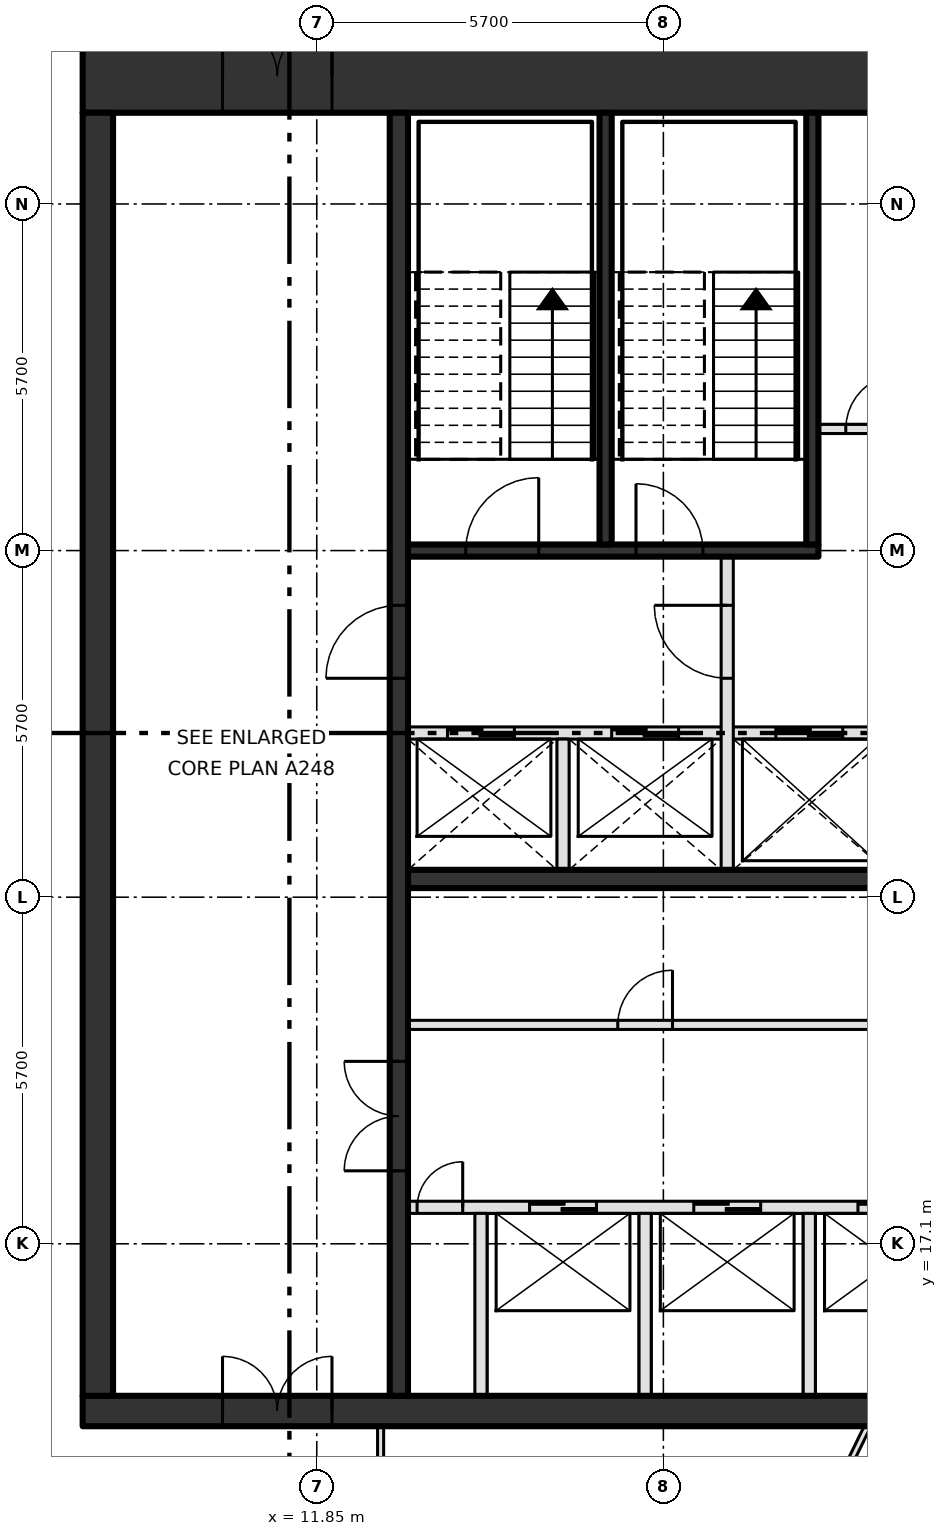
"""IFC4 building model, lengths in metres.
Left out: names, types, materials, properties, quantities, classifications, styles, units other than length and angle.
Written with IfcOpenShell. Run it as: python <this file> out.ifc"""

import sys

from ifc_helpers import new_model, si_unit, direction, frame, frame_2d, origin, place, context, subcontext, project, spatial, rectangle, extrude, element, fill, save


model = new_model("IFC4")
c1 = context("Model", 3, precision=1e-05, world=origin(), true_north=direction((0.0, 1.0)))
c2 = subcontext(c1, "Body", "Model", "MODEL_VIEW")
j1 = project(units=[si_unit("LENGTHUNIT", "METRE"), si_unit("PLANEANGLEUNIT", "RADIAN")], contexts=[c1])
p1 = place(None, origin())
s1 = spatial("IfcSite", under=j1, at=p1, CompositionType="ELEMENT")
p2 = place(p1, origin())
s2 = spatial("IfcBuilding", under=s1, at=p2, CompositionType="ELEMENT")
p3 = place(p2, frame((0.0, 0.0, 366.6)))
s3 = spatial("IfcBuildingStorey", under=s2, at=p3, CompositionType="ELEMENT", Elevation=366.6)
p4 = place(p3, frame((8.0, 14.35, -0.3), z_axis=(0.0, 0.0, 1.0), x_axis=(1.0, 0.0, 0.0)))
e1 = element("IfcWall", 1, at=p4, inside=s3, PredefinedType="SHEAR", context=c2, shape_type="SweptSolid", body=[
    extrude(rectangle(XDim=22.8, YDim=0.5, at=frame_2d((11.4, 0.0))), origin(), (0.0, 0.0, 1.0), 4.2),
])
p5 = place(p4, frame((2.3, 0.0, 0.3)))
e2 = element("IfcOpeningElement", 2, at=p5, cuts=e1, PredefinedType="OPENING", context=c2, shape_type="SweptSolid", body=[
    extrude(rectangle(XDim=1.8, YDim=2.1, at=frame_2d((0.9, 1.05))), frame((0.0, 0.26, 0.0), z_axis=(0.0, -1.0, 0.0), x_axis=(1.0, 0.0, 0.0)), (0.0, 0.0, 1.0), 0.52),
])
p6 = place(p3, frame((8.0, 36.3, -0.3), z_axis=(0.0, 0.0, 1.0), x_axis=(1.0, 0.0, 0.0)))
e3 = element("IfcWall", 3, at=p6, inside=s3, PredefinedType="SHEAR", context=c2, shape_type="SweptSolid", body=[
    extrude(rectangle(XDim=22.8, YDim=1.2, at=frame_2d((11.4, 0.0))), origin(), (0.0, 0.0, 1.0), 4.2),
])
p7 = place(p6, frame((2.3, 0.0, 0.3)))
e4 = element("IfcOpeningElement", 4, at=p7, cuts=e3, PredefinedType="OPENING", context=c2, shape_type="SweptSolid", body=[
    extrude(rectangle(XDim=1.8, YDim=2.1, at=frame_2d((0.9, 1.05))), frame((0.0, 0.61, 0.0), z_axis=(0.0, -1.0, 0.0), x_axis=(1.0, 0.0, 0.0)), (0.0, 0.0, 1.0), 1.22),
])
p8 = place(p3, frame((8.25, 14.6, -0.3), z_axis=(0.0, 0.0, 1.0), x_axis=(0.0, 1.0, 0.0)))
e5 = element("IfcWall", 5, at=p8, inside=s3, PredefinedType="SHEAR", context=c2, shape_type="SweptSolid", body=[
    extrude(rectangle(XDim=21.1, YDim=0.5, at=frame_2d((10.55, 0.0))), origin(), (0.0, 0.0, 1.0), 4.2),
])
p9 = place(p3, frame((13.35, 17.7, 0.0), z_axis=(0.0, 0.0, 1.0), x_axis=(1.0, 0.0, 0.0)))
e6 = element("IfcWall", 6, at=p9, inside=s3, PredefinedType="SOLIDWALL", context=c2, shape_type="SweptSolid", body=[
    extrude(rectangle(XDim=13.425, YDim=0.2, at=frame_2d((6.712, 0.0))), origin(), (0.0, 0.0, 1.0), 3.9),
])
p10 = place(p9, frame((2.0, 0.0, 0.0)))
e7 = element("IfcOpeningElement", 7, at=p10, cuts=e6, PredefinedType="OPENING", context=c2, shape_type="SweptSolid", body=[
    extrude(rectangle(XDim=1.1, YDim=2.1, at=frame_2d((0.55, 1.05))), frame((0.0, 0.11, 0.0), z_axis=(0.0, -1.0, 0.0), x_axis=(1.0, 0.0, 0.0)), (0.0, 0.0, 1.0), 0.22),
])
p11 = place(p9, frame((4.7, 0.0, 0.0)))
e8 = element("IfcOpeningElement", 8, at=p11, cuts=e6, PredefinedType="OPENING", context=c2, shape_type="SweptSolid", body=[
    extrude(rectangle(XDim=1.1, YDim=2.1, at=frame_2d((0.55, 1.05))), frame((0.0, 0.11, 0.0), z_axis=(0.0, -1.0, 0.0), x_axis=(1.0, 0.0, 0.0)), (0.0, 0.0, 1.0), 0.22),
])
p12 = place(p9, frame((7.4, 0.0, 0.0)))
e9 = element("IfcOpeningElement", 9, at=p12, cuts=e6, PredefinedType="OPENING", context=c2, shape_type="SweptSolid", body=[
    extrude(rectangle(XDim=1.1, YDim=2.1, at=frame_2d((0.55, 1.05))), frame((0.0, 0.11, 0.0), z_axis=(0.0, -1.0, 0.0), x_axis=(1.0, 0.0, 0.0)), (0.0, 0.0, 1.0), 0.22),
])
p13 = place(p9, frame((10.1, 0.0, 0.0)))
e10 = element("IfcOpeningElement", 10, at=p13, cuts=e6, PredefinedType="OPENING", context=c2, shape_type="SweptSolid", body=[
    extrude(rectangle(XDim=1.1, YDim=2.1, at=frame_2d((0.55, 1.05))), frame((0.0, 0.11, 0.0), z_axis=(0.0, -1.0, 0.0), x_axis=(1.0, 0.0, 0.0)), (0.0, 0.0, 1.0), 0.22),
])
p14 = place(p9, frame((0.15, 0.0, 0.0)))
e11 = element("IfcOpeningElement", 11, at=p14, cuts=e6, PredefinedType="OPENING", context=c2, shape_type="SweptSolid", body=[
    extrude(rectangle(XDim=0.75, YDim=2.1, at=frame_2d((0.375, 1.05))), frame((0.0, 0.11, 0.0), z_axis=(0.0, -1.0, 0.0), x_axis=(1.0, 0.0, 0.0)), (0.0, 0.0, 1.0), 0.22),
])
p15 = place(p9, frame((12.3, 0.0, 0.0)))
e12 = element("IfcOpeningElement", 12, at=p15, cuts=e6, PredefinedType="OPENING", context=c2, shape_type="SweptSolid", body=[
    extrude(rectangle(XDim=0.75, YDim=2.1, at=frame_2d((0.375, 1.05))), frame((0.0, 0.11, 0.0), z_axis=(0.0, -1.0, 0.0), x_axis=(1.0, 0.0, 0.0)), (0.0, 0.0, 1.0), 0.22),
])
p16 = place(p3, frame((13.35, 20.7, 0.0), z_axis=(0.0, 0.0, 1.0), x_axis=(1.0, 0.0, 0.0)))
e13 = element("IfcWall", 13, at=p16, inside=s3, PredefinedType="PARTITIONING", context=c2, shape_type="SweptSolid", body=[
    extrude(rectangle(XDim=13.425, YDim=0.15, at=frame_2d((6.712, 0.0))), origin(), (0.0, 0.0, 1.0), 3.9),
])
p17 = place(p16, frame((3.45, 0.0, 0.0)))
e14 = element("IfcOpeningElement", 14, at=p17, cuts=e13, PredefinedType="OPENING", context=c2, shape_type="SweptSolid", body=[
    extrude(rectangle(XDim=0.9, YDim=2.1, at=frame_2d((0.45, 1.05))), frame((0.0, 0.085, 0.0), z_axis=(0.0, -1.0, 0.0), x_axis=(1.0, 0.0, 0.0)), (0.0, 0.0, 1.0), 0.17),
])
p18 = place(p16, frame((10.2, 0.0, 0.0)))
e15 = element("IfcOpeningElement", 15, at=p18, cuts=e13, PredefinedType="OPENING", context=c2, shape_type="SweptSolid", body=[
    extrude(rectangle(XDim=0.9, YDim=2.1, at=frame_2d((0.45, 1.05))), frame((0.0, 0.085, 0.0), z_axis=(0.0, -1.0, 0.0), x_axis=(1.0, 0.0, 0.0)), (0.0, 0.0, 1.0), 0.17),
])
p19 = place(p3, frame((13.35, 23.1, 0.0), z_axis=(0.0, 0.0, 1.0), x_axis=(1.0, 0.0, 0.0)))
e16 = element("IfcWall", 16, at=p19, inside=s3, PredefinedType="SHEAR", context=c2, shape_type="SweptSolid", body=[
    extrude(rectangle(XDim=16.95, YDim=0.3, at=frame_2d((8.475, 0.0))), origin(), (0.0, 0.0, 1.0), 3.9),
])
p20 = place(p3, frame((13.35, 25.5, 0.0), z_axis=(0.0, 0.0, 1.0), x_axis=(1.0, 0.0, 0.0)))
e17 = element("IfcWall", 17, at=p20, inside=s3, PredefinedType="SOLIDWALL", context=c2, shape_type="SweptSolid", body=[
    extrude(rectangle(XDim=16.95, YDim=0.2, at=frame_2d((8.475, 0.0))), origin(), (0.0, 0.0, 1.0), 3.9),
])
p21 = place(p20, frame((0.65, 0.0, 0.0)))
e18 = element("IfcOpeningElement", 18, at=p21, cuts=e17, PredefinedType="OPENING", context=c2, shape_type="SweptSolid", body=[
    extrude(rectangle(XDim=1.1, YDim=2.1, at=frame_2d((0.55, 1.05))), frame((0.0, 0.11, 0.0), z_axis=(0.0, -1.0, 0.0), x_axis=(1.0, 0.0, 0.0)), (0.0, 0.0, 1.0), 0.22),
])
p22 = place(p20, frame((3.35, 0.0, 0.0)))
e19 = element("IfcOpeningElement", 19, at=p22, cuts=e17, PredefinedType="OPENING", context=c2, shape_type="SweptSolid", body=[
    extrude(rectangle(XDim=1.1, YDim=2.1, at=frame_2d((0.55, 1.05))), frame((0.0, 0.11, 0.0), z_axis=(0.0, -1.0, 0.0), x_axis=(1.0, 0.0, 0.0)), (0.0, 0.0, 1.0), 0.22),
])
p23 = place(p20, frame((6.05, 0.0, 0.0)))
e20 = element("IfcOpeningElement", 20, at=p23, cuts=e17, PredefinedType="OPENING", context=c2, shape_type="SweptSolid", body=[
    extrude(rectangle(XDim=1.1, YDim=2.1, at=frame_2d((0.55, 1.05))), frame((0.0, 0.11, 0.0), z_axis=(0.0, -1.0, 0.0), x_axis=(1.0, 0.0, 0.0)), (0.0, 0.0, 1.0), 0.22),
])
p24 = place(p20, frame((8.75, 0.0, 0.0)))
e21 = element("IfcOpeningElement", 21, at=p24, cuts=e17, PredefinedType="OPENING", context=c2, shape_type="SweptSolid", body=[
    extrude(rectangle(XDim=1.1, YDim=2.1, at=frame_2d((0.55, 1.05))), frame((0.0, 0.11, 0.0), z_axis=(0.0, -1.0, 0.0), x_axis=(1.0, 0.0, 0.0)), (0.0, 0.0, 1.0), 0.22),
])
p25 = place(p20, frame((13.0, 0.0, 0.0)))
e22 = element("IfcOpeningElement", 22, at=p25, cuts=e17, PredefinedType="OPENING", context=c2, shape_type="SweptSolid", body=[
    extrude(rectangle(XDim=0.9, YDim=2.1, at=frame_2d((0.45, 1.05))), frame((0.0, 0.11, 0.0), z_axis=(0.0, -1.0, 0.0), x_axis=(1.0, 0.0, 0.0)), (0.0, 0.0, 1.0), 0.22),
])
p26 = place(p3, frame((13.35, 28.5, 0.0), z_axis=(0.0, 0.0, 1.0), x_axis=(1.0, 0.0, 0.0)))
e23 = element("IfcWall", 23, at=p26, inside=s3, PredefinedType="SOLIDWALL", context=c2, shape_type="SweptSolid", body=[
    extrude(rectangle(XDim=6.75, YDim=0.2, at=frame_2d((3.375, 0.0))), origin(), (0.0, 0.0, 1.0), 3.9),
])
p27 = place(p26, frame((0.95, 0.0, 0.0)))
e24 = element("IfcOpeningElement", 24, at=p27, cuts=e23, PredefinedType="OPENING", context=c2, shape_type="SweptSolid", body=[
    extrude(rectangle(XDim=1.2, YDim=2.1, at=frame_2d((0.6, 1.05))), frame((0.0, 0.11, 0.0), z_axis=(0.0, -1.0, 0.0), x_axis=(1.0, 0.0, 0.0)), (0.0, 0.0, 1.0), 0.22),
])
p28 = place(p26, frame((3.75, 0.0, 0.0)))
e25 = element("IfcOpeningElement", 25, at=p28, cuts=e23, PredefinedType="OPENING", context=c2, shape_type="SweptSolid", body=[
    extrude(rectangle(XDim=1.1, YDim=2.1, at=frame_2d((0.55, 1.05))), frame((0.0, 0.11, 0.0), z_axis=(0.0, -1.0, 0.0), x_axis=(1.0, 0.0, 0.0)), (0.0, 0.0, 1.0), 0.22),
])
p29 = place(p3, frame((20.1, 30.5, 0.0), z_axis=(0.0, 0.0, 1.0), x_axis=(1.0, 0.0, 0.0)))
e26 = element("IfcWall", 26, at=p29, inside=s3, PredefinedType="PARTITIONING", context=c2, shape_type="SweptSolid", body=[
    extrude(rectangle(XDim=10.2, YDim=0.15, at=frame_2d((5.1, 0.0))), origin(), (0.0, 0.0, 1.0), 3.9),
])
p30 = place(p29, frame((0.45, 0.0, 0.0)))
e27 = element("IfcOpeningElement", 27, at=p30, cuts=e26, PredefinedType="OPENING", context=c2, shape_type="SweptSolid", body=[
    extrude(rectangle(XDim=0.9, YDim=2.1, at=frame_2d((0.45, 1.05))), frame((0.0, 0.085, 0.0), z_axis=(0.0, -1.0, 0.0), x_axis=(1.0, 0.0, 0.0)), (0.0, 0.0, 1.0), 0.17),
])
p31 = place(p29, frame((3.35, 0.0, 0.0)))
e28 = element("IfcOpeningElement", 28, at=p31, cuts=e26, PredefinedType="OPENING", context=c2, shape_type="SweptSolid", body=[
    extrude(rectangle(XDim=0.9, YDim=2.1, at=frame_2d((0.45, 1.05))), frame((0.0, 0.085, 0.0), z_axis=(0.0, -1.0, 0.0), x_axis=(1.0, 0.0, 0.0)), (0.0, 0.0, 1.0), 0.17),
])
p32 = place(p29, frame((7.15, 0.0, 0.0)))
e29 = element("IfcOpeningElement", 29, at=p32, cuts=e26, PredefinedType="OPENING", context=c2, shape_type="SweptSolid", body=[
    extrude(rectangle(XDim=0.9, YDim=2.1, at=frame_2d((0.45, 1.05))), frame((0.0, 0.085, 0.0), z_axis=(0.0, -1.0, 0.0), x_axis=(1.0, 0.0, 0.0)), (0.0, 0.0, 1.0), 0.17),
])
p33 = place(p3, frame((13.2, 14.6, 0.0), z_axis=(0.0, 0.0, 1.0), x_axis=(0.0, 1.0, 0.0)))
e30 = element("IfcWall", 30, at=p33, inside=s3, PredefinedType="SHEAR", context=c2, shape_type="SweptSolid", body=[
    extrude(rectangle(XDim=21.1, YDim=0.3, at=frame_2d((10.55, 0.0))), origin(), (0.0, 0.0, 1.0), 3.9),
])
p34 = place(p33, frame((3.7, 0.0, 0.0)))
e31 = element("IfcOpeningElement", 31, at=p34, cuts=e30, PredefinedType="OPENING", context=c2, shape_type="SweptSolid", body=[
    extrude(rectangle(XDim=1.8, YDim=2.1, at=frame_2d((0.9, 1.05))), frame((0.0, 0.16, 0.0), z_axis=(0.0, -1.0, 0.0), x_axis=(1.0, 0.0, 0.0)), (0.0, 0.0, 1.0), 0.32),
])
p35 = place(p33, frame((11.8, 0.0, 0.0)))
e32 = element("IfcOpeningElement", 32, at=p35, cuts=e30, PredefinedType="OPENING", context=c2, shape_type="SweptSolid", body=[
    extrude(rectangle(XDim=1.2, YDim=2.1, at=frame_2d((0.6, 1.05))), frame((0.0, 0.16, 0.0), z_axis=(0.0, -1.0, 0.0), x_axis=(1.0, 0.0, 0.0)), (0.0, 0.0, 1.0), 0.32),
])
p36 = place(p3, frame((14.55, 14.6, 0.0), z_axis=(0.0, 0.0, 1.0), x_axis=(0.0, 1.0, 0.0)))
e33 = element("IfcWall", 33, at=p36, inside=s3, PredefinedType="SOLIDWALL", context=c2, shape_type="SweptSolid", body=[
    extrude(rectangle(XDim=3.0, YDim=0.2, at=frame_2d((1.5, 0.0))), origin(), (0.0, 0.0, 1.0), 3.9),
])
p37 = place(p3, frame((15.9, 23.25, 0.0), z_axis=(0.0, 0.0, 1.0), x_axis=(0.0, 1.0, 0.0)))
e34 = element("IfcWall", 34, at=p37, inside=s3, PredefinedType="SOLIDWALL", context=c2, shape_type="SweptSolid", body=[
    extrude(rectangle(XDim=2.15, YDim=0.2, at=frame_2d((1.075, 0.0))), origin(), (0.0, 0.0, 1.0), 3.9),
])
p38 = place(p3, frame((16.6, 28.6, 0.0), z_axis=(0.0, 0.0, 1.0), x_axis=(0.0, 1.0, 0.0)))
e35 = element("IfcWall", 35, at=p38, inside=s3, PredefinedType="SOLIDWALL", context=c2, shape_type="SweptSolid", body=[
    extrude(rectangle(XDim=7.1, YDim=0.2, at=frame_2d((3.55, 0.0))), origin(), (0.0, 0.0, 1.0), 3.9),
])
p39 = place(p3, frame((17.25, 14.6, 0.0), z_axis=(0.0, 0.0, 1.0), x_axis=(0.0, 1.0, 0.0)))
e36 = element("IfcWall", 36, at=p39, inside=s3, PredefinedType="SOLIDWALL", context=c2, shape_type="SweptSolid", body=[
    extrude(rectangle(XDim=3.0, YDim=0.2, at=frame_2d((1.5, 0.0))), origin(), (0.0, 0.0, 1.0), 3.9),
])
p40 = place(p3, frame((18.6, 23.25, 0.0), z_axis=(0.0, 0.0, 1.0), x_axis=(0.0, 1.0, 0.0)))
e37 = element("IfcWall", 37, at=p40, inside=s3, PredefinedType="SOLIDWALL", context=c2, shape_type="SweptSolid", body=[
    extrude(rectangle(XDim=5.15, YDim=0.2, at=frame_2d((2.575, 0.0))), origin(), (0.0, 0.0, 1.0), 3.9),
])
p41 = place(p40, frame((3.15, 0.0, 0.0)))
e38 = element("IfcOpeningElement", 38, at=p41, cuts=e37, PredefinedType="OPENING", context=c2, shape_type="SweptSolid", body=[
    extrude(rectangle(XDim=1.2, YDim=2.1, at=frame_2d((0.6, 1.05))), frame((0.0, 0.11, 0.0), z_axis=(0.0, -1.0, 0.0), x_axis=(1.0, 0.0, 0.0)), (0.0, 0.0, 1.0), 0.22),
])
p42 = place(p3, frame((19.95, 14.6, 0.0), z_axis=(0.0, 0.0, 1.0), x_axis=(0.0, 1.0, 0.0)))
e39 = element("IfcWall", 39, at=p42, inside=s3, PredefinedType="SOLIDWALL", context=c2, shape_type="SweptSolid", body=[
    extrude(rectangle(XDim=3.0, YDim=0.2, at=frame_2d((1.5, 0.0))), origin(), (0.0, 0.0, 1.0), 3.9),
])
p43 = place(p3, frame((20.0, 28.6, 0.0), z_axis=(0.0, 0.0, 1.0), x_axis=(0.0, 1.0, 0.0)))
e40 = element("IfcWall", 40, at=p43, inside=s3, PredefinedType="SOLIDWALL", context=c2, shape_type="SweptSolid", body=[
    extrude(rectangle(XDim=7.1, YDim=0.2, at=frame_2d((3.55, 0.0))), origin(), (0.0, 0.0, 1.0), 3.9),
])
p44 = place(p3, frame((12.9, 10.078, 0.0), z_axis=(0.0, 0.0, 1.0), x_axis=(0.0, 1.0, 0.0)))
e41 = element("IfcWall", 41, at=p44, inside=s3, PredefinedType="PARTITIONING", context=c2, shape_type="SweptSolid", body=[
    extrude(rectangle(XDim=4.022, YDim=0.1, at=frame_2d((2.011, 0.0))), origin(), (0.0, 0.0, 1.0), 3.9),
])
p45 = place(p3, frame((18.105, 8.354, 0.0), z_axis=(0.0, 0.0, 1.0), x_axis=(0.438424384383, 0.898768078638, 0.0)))
e42 = element("IfcWall", 42, at=p45, inside=s3, PredefinedType="PARTITIONING", context=c2, shape_type="SweptSolid", body=[
    extrude(rectangle(XDim=6.393, YDim=0.1, at=frame_2d((3.197, 0.0))), origin(), (0.0, 0.0, 1.0), 3.9),
])
p46 = place(p10, origin())
e43 = element("IfcDoor", 43, at=p46, inside=s3, OperationType="SLIDING_TO_LEFT", PredefinedType="DOOR", context=c2, shape_type="SweptSolid", body=[
    extrude(rectangle(XDim=1.1, YDim=2.1, at=frame_2d((0.55, 1.05))), frame((0.0, 0.025, 0.0), z_axis=(0.0, -1.0, 0.0), x_axis=(1.0, 0.0, 0.0)), (0.0, 0.0, 1.0), 0.05),
])
fill(e7, e43)
p47 = place(p11, origin())
e44 = element("IfcDoor", 44, at=p47, inside=s3, OperationType="SLIDING_TO_LEFT", PredefinedType="DOOR", context=c2, shape_type="SweptSolid", body=[
    extrude(rectangle(XDim=1.1, YDim=2.1, at=frame_2d((0.55, 1.05))), frame((0.0, 0.025, 0.0), z_axis=(0.0, -1.0, 0.0), x_axis=(1.0, 0.0, 0.0)), (0.0, 0.0, 1.0), 0.05),
])
fill(e8, e44)
p48 = place(p12, origin())
e45 = element("IfcDoor", 45, at=p48, inside=s3, OperationType="SLIDING_TO_LEFT", PredefinedType="DOOR", context=c2, shape_type="SweptSolid", body=[
    extrude(rectangle(XDim=1.1, YDim=2.1, at=frame_2d((0.55, 1.05))), frame((0.0, 0.025, 0.0), z_axis=(0.0, -1.0, 0.0), x_axis=(1.0, 0.0, 0.0)), (0.0, 0.0, 1.0), 0.05),
])
fill(e9, e45)
p49 = place(p21, origin())
e46 = element("IfcDoor", 46, at=p49, inside=s3, OperationType="SLIDING_TO_LEFT", PredefinedType="DOOR", context=c2, shape_type="SweptSolid", body=[
    extrude(rectangle(XDim=1.1, YDim=2.1, at=frame_2d((0.55, 1.05))), frame((0.0, 0.025, 0.0), z_axis=(0.0, -1.0, 0.0), x_axis=(1.0, 0.0, 0.0)), (0.0, 0.0, 1.0), 0.05),
])
fill(e18, e46)
p50 = place(p22, origin())
e47 = element("IfcDoor", 47, at=p50, inside=s3, OperationType="SLIDING_TO_LEFT", PredefinedType="DOOR", context=c2, shape_type="SweptSolid", body=[
    extrude(rectangle(XDim=1.1, YDim=2.1, at=frame_2d((0.55, 1.05))), frame((0.0, 0.025, 0.0), z_axis=(0.0, -1.0, 0.0), x_axis=(1.0, 0.0, 0.0)), (0.0, 0.0, 1.0), 0.05),
])
fill(e19, e47)
p51 = place(p23, origin())
e48 = element("IfcDoor", 48, at=p51, inside=s3, OperationType="SLIDING_TO_LEFT", PredefinedType="DOOR", context=c2, shape_type="SweptSolid", body=[
    extrude(rectangle(XDim=1.1, YDim=2.1, at=frame_2d((0.55, 1.05))), frame((0.0, 0.025, 0.0), z_axis=(0.0, -1.0, 0.0), x_axis=(1.0, 0.0, 0.0)), (0.0, 0.0, 1.0), 0.05),
])
fill(e20, e48)
p52 = place(p14, origin())
e49 = element("IfcDoor", 49, at=p52, inside=s3, OperationType="SINGLE_SWING_RIGHT", PredefinedType="DOOR", context=c2, shape_type="SweptSolid", body=[
    extrude(rectangle(XDim=0.75, YDim=2.1, at=frame_2d((0.375, 1.05))), frame((0.0, 0.025, 0.0), z_axis=(0.0, -1.0, 0.0), x_axis=(1.0, 0.0, 0.0)), (0.0, 0.0, 1.0), 0.05),
])
fill(e11, e49)
p53 = place(p17, origin())
e50 = element("IfcDoor", 50, at=p53, inside=s3, OperationType="SINGLE_SWING_RIGHT", PredefinedType="DOOR", context=c2, shape_type="SweptSolid", body=[
    extrude(rectangle(XDim=0.9, YDim=2.1, at=frame_2d((0.45, 1.05))), frame((0.0, 0.025, 0.0), z_axis=(0.0, -1.0, 0.0), x_axis=(1.0, 0.0, 0.0)), (0.0, 0.0, 1.0), 0.05),
])
fill(e14, e50)
p54 = place(p30, origin())
e51 = element("IfcDoor", 51, at=p54, inside=s3, OperationType="SINGLE_SWING_RIGHT", PredefinedType="DOOR", context=c2, shape_type="SweptSolid", body=[
    extrude(rectangle(XDim=0.9, YDim=2.1, at=frame_2d((0.45, 1.05))), frame((0.0, 0.025, 0.0), z_axis=(0.0, -1.0, 0.0), x_axis=(1.0, 0.0, 0.0)), (0.0, 0.0, 1.0), 0.05),
])
fill(e27, e51)
p55 = place(p27, origin())
e52 = element("IfcDoor", 52, at=p55, inside=s3, OperationType="SINGLE_SWING_RIGHT", PredefinedType="DOOR", context=c2, shape_type="SweptSolid", body=[
    extrude(rectangle(XDim=1.2, YDim=2.1, at=frame_2d((0.6, 1.05))), frame((0.0, 0.025, 0.0), z_axis=(0.0, -1.0, 0.0), x_axis=(1.0, 0.0, 0.0)), (0.0, 0.0, 1.0), 0.05),
])
fill(e24, e52)
p56 = place(p28, origin())
e53 = element("IfcDoor", 53, at=p56, inside=s3, OperationType="SINGLE_SWING_LEFT", PredefinedType="DOOR", context=c2, shape_type="SweptSolid", body=[
    extrude(rectangle(XDim=1.1, YDim=2.1, at=frame_2d((0.55, 1.05))), frame((0.0, 0.025, 0.0), z_axis=(0.0, -1.0, 0.0), x_axis=(1.0, 0.0, 0.0)), (0.0, 0.0, 1.0), 0.05),
])
fill(e25, e53)
p57 = place(p34, origin())
e54 = element("IfcDoor", 54, at=p57, inside=s3, OperationType="DOUBLE_DOOR_SINGLE_SWING", PredefinedType="DOOR", context=c2, shape_type="SweptSolid", body=[
    extrude(rectangle(XDim=1.8, YDim=2.1, at=frame_2d((0.9, 1.05))), frame((0.0, 0.025, 0.0), z_axis=(0.0, -1.0, 0.0), x_axis=(1.0, 0.0, 0.0)), (0.0, 0.0, 1.0), 0.05),
])
fill(e31, e54)
p58 = place(p35, origin())
e55 = element("IfcDoor", 55, at=p58, inside=s3, OperationType="SINGLE_SWING_LEFT", PredefinedType="DOOR", context=c2, shape_type="SweptSolid", body=[
    extrude(rectangle(XDim=1.2, YDim=2.1, at=frame_2d((0.6, 1.05))), frame((0.0, 0.025, 0.0), z_axis=(0.0, -1.0, 0.0), x_axis=(1.0, 0.0, 0.0)), (0.0, 0.0, 1.0), 0.05),
])
fill(e32, e55)
p59 = place(p41, origin())
e56 = element("IfcDoor", 56, at=p59, inside=s3, OperationType="SINGLE_SWING_RIGHT", PredefinedType="DOOR", context=c2, shape_type="SweptSolid", body=[
    extrude(rectangle(XDim=1.2, YDim=2.1, at=frame_2d((0.6, 1.05))), frame((0.0, 0.025, 0.0), z_axis=(0.0, -1.0, 0.0), x_axis=(1.0, 0.0, 0.0)), (0.0, 0.0, 1.0), 0.05),
])
fill(e38, e56)
p60 = place(p7, origin())
e57 = element("IfcDoor", 57, at=p60, inside=s3, OperationType="DOUBLE_DOOR_SINGLE_SWING", PredefinedType="DOOR", context=c2, shape_type="SweptSolid", body=[
    extrude(rectangle(XDim=1.8, YDim=2.1, at=frame_2d((0.9, 1.05))), frame((0.0, 0.025, 0.0), z_axis=(0.0, -1.0, 0.0), x_axis=(1.0, 0.0, 0.0)), (0.0, 0.0, 1.0), 0.05),
])
fill(e4, e57)
p61 = place(p5, origin())
e58 = element("IfcDoor", 58, at=p61, inside=s3, OperationType="DOUBLE_DOOR_SINGLE_SWING", PredefinedType="DOOR", context=c2, shape_type="SweptSolid", body=[
    extrude(rectangle(XDim=1.8, YDim=2.1, at=frame_2d((0.9, 1.05))), frame((0.0, 0.025, 0.0), z_axis=(0.0, -1.0, 0.0), x_axis=(1.0, 0.0, 0.0)), (0.0, 0.0, 1.0), 0.05),
])
fill(e2, e58)
save(model, sys.argv[1])
